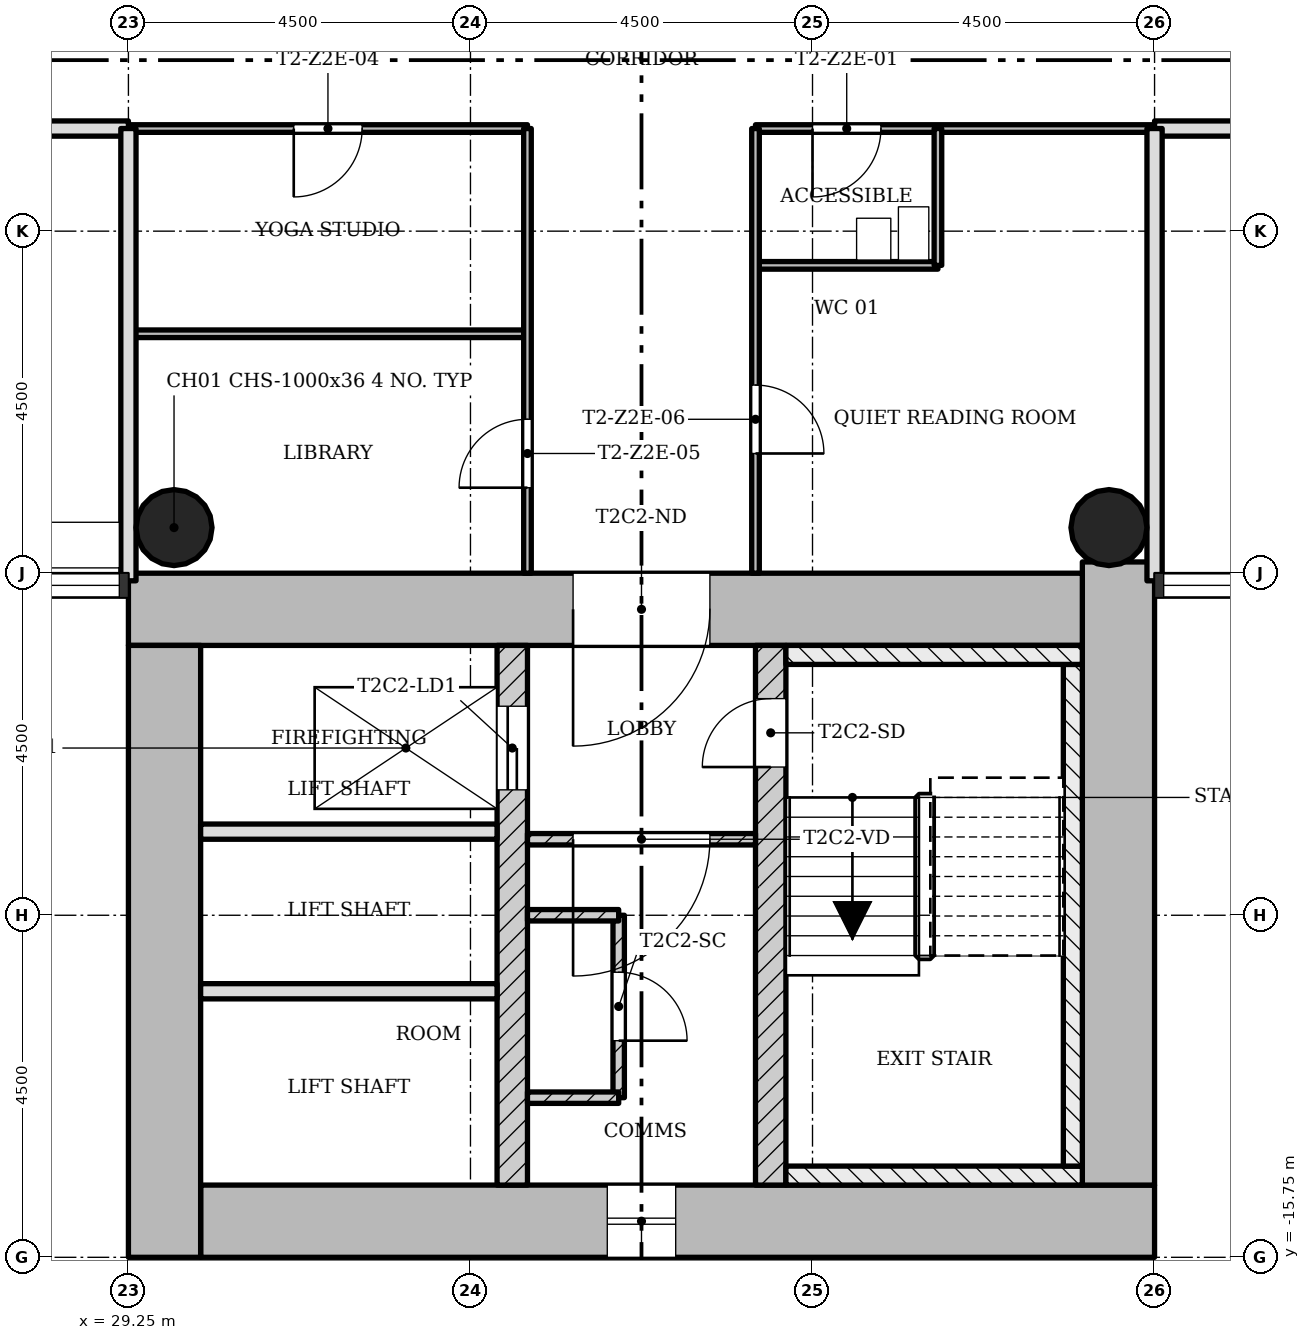
"""IFC4 building model, lengths in metres.
Left out: names, types, materials, properties, quantities, classifications, styles, units other than length and angle.
Written with IfcOpenShell. Run it as: python <this file> out.ifc"""

import sys

from ifc_helpers import new_model, si_unit, direction, frame, frame_2d, origin, origin_2d, place, context, subcontext, project, spatial, rectangle, hollow_circle, extrude, element, fill, save


model = new_model("IFC4")
c1 = context("Model", 3, precision=1e-05, world=origin(), true_north=direction((0.0, 1.0)))
c2 = subcontext(c1, "Body", "Model", "MODEL_VIEW")
j1 = project(units=[si_unit("LENGTHUNIT", "METRE"), si_unit("PLANEANGLEUNIT", "RADIAN")], contexts=[c1])
p1 = place(None, origin())
s1 = spatial("IfcSite", under=j1, at=p1, CompositionType="ELEMENT")
p2 = place(p1, origin())
s2 = spatial("IfcBuilding", under=s1, at=p2, CompositionType="ELEMENT")
p3 = place(p2, frame((0.0, 0.0, 103.8)))
s3 = spatial("IfcBuildingStorey", under=s2, at=p3, CompositionType="ELEMENT", Elevation=103.8)
p4 = place(p3, frame((30.2, -15.275, 0.0), z_axis=(0.0, 0.0, 1.0), x_axis=(1.0, 0.0, 0.0)))
e1 = element("IfcWall", 1, at=p4, inside=s3, PredefinedType="SHEAR", context=c2, shape_type="SweptSolid", body=[
    extrude(rectangle(XDim=12.55, YDim=0.95, at=frame_2d((6.275, 0.0))), origin(), (0.0, 0.0, 1.0), 3.4),
])
p5 = place(p4, frame((5.35, 0.0, 0.45)))
e2 = element("IfcOpeningElement", 2, at=p5, cuts=e1, PredefinedType="OPENING", context=c2, shape_type="SweptSolid", body=[
    extrude(rectangle(XDim=0.9, YDim=2.4, at=frame_2d((0.45, 1.2))), frame((0.0, 0.485, 0.0), z_axis=(0.0, -1.0, 0.0), x_axis=(1.0, 0.0, 0.0)), (0.0, 0.0, 1.0), 0.97),
])
p6 = place(p3, frame((42.275, -14.8, 0.0), z_axis=(0.0, 0.0, 1.0), x_axis=(0.0, 1.0, 0.0)))
e3 = element("IfcWall", 3, at=p6, inside=s3, PredefinedType="SHEAR", context=c2, shape_type="SweptSolid", body=[
    extrude(rectangle(XDim=8.198, YDim=0.95, at=frame_2d((4.099, 0.0))), origin(), (0.0, 0.0, 1.0), 3.4),
])
p7 = place(p3, frame((41.8, -7.225, 0.0), z_axis=(0.0, 0.0, 1.0), x_axis=(-1.0, 0.0, 0.0)))
e4 = element("IfcWall", 4, at=p7, inside=s3, PredefinedType="SHEAR", context=c2, shape_type="SweptSolid", body=[
    extrude(rectangle(XDim=12.55, YDim=0.95, at=frame_2d((6.275, 0.0))), origin(), (0.0, 0.0, 1.0), 3.4),
])
p8 = place(p7, frame((4.9, 0.0, 0.0)))
e5 = element("IfcOpeningElement", 5, at=p8, cuts=e4, PredefinedType="OPENING", context=c2, shape_type="SweptSolid", body=[
    extrude(rectangle(XDim=1.8, YDim=2.1, at=frame_2d((0.9, 1.05))), frame((0.0, 0.485, 0.0), z_axis=(0.0, -1.0, 0.0), x_axis=(1.0, 0.0, 0.0)), (0.0, 0.0, 1.0), 0.97),
])
p9 = place(p3, frame((29.725, -7.7, 0.0), z_axis=(0.0, 0.0, 1.0), x_axis=(0.0, -1.0, 0.0)))
e6 = element("IfcWall", 6, at=p9, inside=s3, PredefinedType="SHEAR", context=c2, shape_type="SweptSolid", body=[
    extrude(rectangle(XDim=8.05, YDim=0.95, at=frame_2d((4.025, 0.0))), origin(), (0.0, 0.0, 1.0), 3.4),
])
p10 = place(p3, frame((34.3, -14.8, 0.0), z_axis=(0.0, 0.0, 1.0), x_axis=(0.0, 1.0, 0.0)))
e7 = element("IfcWall", 7, at=p10, inside=s3, PredefinedType="SHEAR", context=c2, shape_type="SweptSolid", body=[
    extrude(rectangle(XDim=7.1, YDim=0.4, at=frame_2d((3.55, 0.0))), origin(), (0.0, 0.0, 1.0), 3.4),
])
p11 = place(p10, frame((5.2, 0.0, 0.0)))
e8 = element("IfcOpeningElement", 8, at=p11, cuts=e7, PredefinedType="OPENING", context=c2, shape_type="SweptSolid", body=[
    extrude(rectangle(XDim=1.1, YDim=2.1, at=frame_2d((0.55, 1.05))), frame((0.0, 0.21, 0.0), z_axis=(0.0, -1.0, 0.0), x_axis=(1.0, 0.0, 0.0)), (0.0, 0.0, 1.0), 0.42),
])
p12 = place(p3, frame((37.7, -14.8, 0.0), z_axis=(0.0, 0.0, 1.0), x_axis=(0.0, 1.0, 0.0)))
e9 = element("IfcWall", 9, at=p12, inside=s3, PredefinedType="SHEAR", context=c2, shape_type="SweptSolid", body=[
    extrude(rectangle(XDim=7.1, YDim=0.4, at=frame_2d((3.55, 0.0))), origin(), (0.0, 0.0, 1.0), 3.4),
])
p13 = place(p12, frame((5.5, 0.0, 0.0)))
e10 = element("IfcOpeningElement", 10, at=p13, cuts=e9, PredefinedType="OPENING", context=c2, shape_type="SweptSolid", body=[
    extrude(rectangle(XDim=0.9, YDim=2.1, at=frame_2d((0.45, 1.05))), frame((0.0, 0.21, 0.0), z_axis=(0.0, -1.0, 0.0), x_axis=(1.0, 0.0, 0.0)), (0.0, 0.0, 1.0), 0.42),
])
for number, where, z_axis, x_axis in (
    (11, (42.15, -6.15, 0.0), (0.0, 0.0, 1.0), (1.0, 0.0, 0.0)),
    (12, (29.85, -6.15, 0.0), (0.0, 0.0, 1.0), (1.0, 0.0, 0.0)),
):
    element("IfcColumn", number, at=place(p3, frame(where, z_axis=z_axis, x_axis=x_axis)), inside=s3, PredefinedType="COLUMN", context=c2, shape_type="SweptSolid", body=[
        extrude(hollow_circle(Radius=0.5, WallThickness=0.036, at=origin_2d()), origin(), (0.0, 0.0, 1.0), 3.4),
    ])
p14 = place(p3, frame((34.5, -10.25, 0.0), z_axis=(0.0, 0.0, 1.0), x_axis=(1.0, 0.0, 0.0)))
e13 = element("IfcWall", 13, at=p14, inside=s3, PredefinedType="PARTITIONING", context=c2, shape_type="SweptSolid", body=[
    extrude(rectangle(XDim=3.0, YDim=0.15, at=frame_2d((1.5, 0.0))), origin(), (0.0, 0.0, 1.0), 3.0),
])
p15 = place(p14, frame((0.6, 0.0, 0.0)))
e14 = element("IfcOpeningElement", 14, at=p15, cuts=e13, PredefinedType="OPENING", context=c2, shape_type="SweptSolid", body=[
    extrude(rectangle(XDim=1.8, YDim=2.1, at=frame_2d((0.9, 1.05))), frame((0.0, 0.085, 0.0), z_axis=(0.0, -1.0, 0.0), x_axis=(1.0, 0.0, 0.0)), (0.0, 0.0, 1.0), 0.17),
])
for number, where, z_axis, x_axis in (
    (15, (30.2, -10.15, 0.0), (0.0, 0.0, 1.0), (1.0, 0.0, 0.0)),
    (16, (30.2, -12.25, 0.0), (0.0, 0.0, 1.0), (1.0, 0.0, 0.0)),
):
    element("IfcWall", number, at=place(p3, frame(where, z_axis=z_axis, x_axis=x_axis)), inside=s3, PredefinedType="SOLIDWALL", context=c2, shape_type="SweptSolid", body=[
        extrude(rectangle(XDim=3.9, YDim=0.2, at=frame_2d((1.95, 0.0))), origin(), (0.0, 0.0, 1.0), 3.0),
    ])
p16 = place(p3, frame((35.7, -11.25, 0.0), z_axis=(0.0, 0.0, 1.0), x_axis=(0.0, -1.0, 0.0)))
e17 = element("IfcWall", 17, at=p16, inside=s3, PredefinedType="PARTITIONING", context=c2, shape_type="SweptSolid", body=[
    extrude(rectangle(XDim=2.4, YDim=0.15, at=frame_2d((1.2, 0.0))), origin(), (0.0, 0.0, 1.0), 3.0),
])
p17 = place(p16, frame((0.75, 0.0, 0.0)))
e18 = element("IfcOpeningElement", 18, at=p17, cuts=e17, PredefinedType="OPENING", context=c2, shape_type="SweptSolid", body=[
    extrude(rectangle(XDim=0.9, YDim=2.1, at=frame_2d((0.45, 1.05))), frame((0.0, 0.085, 0.0), z_axis=(0.0, -1.0, 0.0), x_axis=(1.0, 0.0, 0.0)), (0.0, 0.0, 1.0), 0.17),
])
for number, where, z_axis, x_axis in (
    (19, (35.7, -11.25, 0.0), (0.0, 0.0, 1.0), (-1.0, 0.0, 0.0)),
    (20, (35.7, -13.65, 0.0), (0.0, 0.0, 1.0), (-1.0, 0.0, 0.0)),
):
    element("IfcWall", number, at=place(p3, frame(where, z_axis=z_axis, x_axis=x_axis)), inside=s3, PredefinedType="PARTITIONING", context=c2, shape_type="SweptSolid", body=[
        extrude(rectangle(XDim=1.2, YDim=0.15, at=frame_2d((0.6, 0.0))), origin(), (0.0, 0.0, 1.0), 3.0),
    ])
p18 = place(p3, frame((34.5, -3.6, 0.0), z_axis=(0.0, 0.0, 1.0), x_axis=(-1.0, 0.0, 0.0)))
e21 = element("IfcWall", 21, at=p18, inside=s3, PredefinedType="PARTITIONING", context=c2, shape_type="SweptSolid", body=[
    extrude(rectangle(XDim=5.25, YDim=0.1, at=frame_2d((2.625, 0.0))), origin(), (0.0, 0.0, 1.0), 3.0),
])
p19 = place(p3, frame((39.9, -2.7, 0.0), z_axis=(0.0, 0.0, 1.0), x_axis=(-1.0, 0.0, 0.0)))
e22 = element("IfcWall", 22, at=p19, inside=s3, PredefinedType="PARTITIONING", context=c2, shape_type="SweptSolid", body=[
    extrude(rectangle(XDim=2.4, YDim=0.1, at=frame_2d((1.2, 0.0))), origin(), (0.0, 0.0, 1.0), 3.0),
])
p20 = place(p3, frame((42.75, -0.9, 0.0), z_axis=(0.0, 0.0, 1.0), x_axis=(-1.0, 0.0, 0.0)))
e23 = element("IfcWall", 23, at=p20, inside=s3, PredefinedType="PARTITIONING", context=c2, shape_type="SweptSolid", body=[
    extrude(rectangle(XDim=5.25, YDim=0.1, at=frame_2d((2.625, 0.0))), origin(), (0.0, 0.0, 1.0), 3.0),
])
p21 = place(p20, frame((3.6, 0.0, 0.0)))
e24 = element("IfcOpeningElement", 24, at=p21, cuts=e23, PredefinedType="OPENING", context=c2, shape_type="SweptSolid", body=[
    extrude(rectangle(XDim=0.9, YDim=2.1, at=frame_2d((0.45, 1.05))), frame((0.0, 0.06, 0.0), z_axis=(0.0, -1.0, 0.0), x_axis=(1.0, 0.0, 0.0)), (0.0, 0.0, 1.0), 0.12),
])
p22 = place(p3, frame((34.5, -0.9, 0.0), z_axis=(0.0, 0.0, 1.0), x_axis=(-1.0, 0.0, 0.0)))
e25 = element("IfcWall", 25, at=p22, inside=s3, PredefinedType="PARTITIONING", context=c2, shape_type="SweptSolid", body=[
    extrude(rectangle(XDim=5.25, YDim=0.1, at=frame_2d((2.625, 0.0))), origin(), (0.0, 0.0, 1.0), 3.0),
])
p23 = place(p22, frame((2.175, 0.0, 0.0)))
e26 = element("IfcOpeningElement", 26, at=p23, cuts=e25, PredefinedType="OPENING", context=c2, shape_type="SweptSolid", body=[
    extrude(rectangle(XDim=0.9, YDim=2.1, at=frame_2d((0.45, 1.05))), frame((0.0, 0.06, 0.0), z_axis=(0.0, -1.0, 0.0), x_axis=(1.0, 0.0, 0.0)), (0.0, 0.0, 1.0), 0.12),
])
for number, where, z_axis, x_axis in (
    (27, (44.55, -0.9, 0.0), (0.0, 0.0, 1.0), (-1.0, 0.0, 0.0)),
    (28, (29.25, -0.9, 0.0), (0.0, 0.0, 1.0), (-1.0, 0.0, 0.0)),
):
    element("IfcWall", number, at=place(p3, frame(where, z_axis=z_axis, x_axis=x_axis)), inside=s3, PredefinedType="SOLIDWALL", context=c2, shape_type="SweptSolid", body=[
        extrude(rectangle(XDim=1.8, YDim=0.2, at=frame_2d((0.9, 0.0))), origin(), (0.0, 0.0, 1.0), 3.0),
    ])
p24 = place(p3, frame((42.75, -6.85, 0.0), z_axis=(0.0, 0.0, 1.0), x_axis=(0.0, 1.0, 0.0)))
e29 = element("IfcWall", 29, at=p24, inside=s3, PredefinedType="SOLIDWALL", context=c2, shape_type="SweptSolid", body=[
    extrude(rectangle(XDim=5.95, YDim=0.2, at=frame_2d((2.975, 0.0))), origin(), (0.0, 0.0, 1.0), 3.0),
])
p25 = place(p3, frame((39.9, -2.7, 0.0), z_axis=(0.0, 0.0, 1.0), x_axis=(0.0, 1.0, 0.0)))
e30 = element("IfcWall", 30, at=p25, inside=s3, PredefinedType="PARTITIONING", context=c2, shape_type="SweptSolid", body=[
    extrude(rectangle(XDim=1.8, YDim=0.1, at=frame_2d((0.9, 0.0))), origin(), (0.0, 0.0, 1.0), 3.0),
])
p26 = place(p3, frame((37.5, -6.75, 0.0), z_axis=(0.0, 0.0, 1.0), x_axis=(0.0, 1.0, 0.0)))
e31 = element("IfcWall", 31, at=p26, inside=s3, PredefinedType="PARTITIONING", context=c2, shape_type="SweptSolid", body=[
    extrude(rectangle(XDim=5.85, YDim=0.1, at=frame_2d((2.925, 0.0))), origin(), (0.0, 0.0, 1.0), 3.0),
])
p27 = place(p26, frame((1.575, 0.0, 0.0)))
e32 = element("IfcOpeningElement", 32, at=p27, cuts=e31, PredefinedType="OPENING", context=c2, shape_type="SweptSolid", body=[
    extrude(rectangle(XDim=0.9, YDim=2.1, at=frame_2d((0.45, 1.05))), frame((0.0, 0.06, 0.0), z_axis=(0.0, -1.0, 0.0), x_axis=(1.0, 0.0, 0.0)), (0.0, 0.0, 1.0), 0.12),
])
p28 = place(p3, frame((34.5, -6.75, 0.0), z_axis=(0.0, 0.0, 1.0), x_axis=(0.0, 1.0, 0.0)))
e33 = element("IfcWall", 33, at=p28, inside=s3, PredefinedType="PARTITIONING", context=c2, shape_type="SweptSolid", body=[
    extrude(rectangle(XDim=5.85, YDim=0.1, at=frame_2d((2.925, 0.0))), origin(), (0.0, 0.0, 1.0), 3.0),
])
p29 = place(p28, frame((1.125, 0.0, 0.0)))
e34 = element("IfcOpeningElement", 34, at=p29, cuts=e33, PredefinedType="OPENING", context=c2, shape_type="SweptSolid", body=[
    extrude(rectangle(XDim=0.9, YDim=2.1, at=frame_2d((0.45, 1.05))), frame((0.0, 0.06, 0.0), z_axis=(0.0, -1.0, 0.0), x_axis=(1.0, 0.0, 0.0)), (0.0, 0.0, 1.0), 0.12),
])
p30 = place(p3, frame((29.25, -6.85, 0.0), z_axis=(0.0, 0.0, 1.0), x_axis=(0.0, 1.0, 0.0)))
e35 = element("IfcWall", 35, at=p30, inside=s3, PredefinedType="SOLIDWALL", context=c2, shape_type="SweptSolid", body=[
    extrude(rectangle(XDim=5.95, YDim=0.2, at=frame_2d((2.975, 0.0))), origin(), (0.0, 0.0, 1.0), 3.0),
])
p31 = place(p3, frame((37.9, -14.675, 0.0), z_axis=(0.0, 0.0, 1.0), x_axis=(1.0, 0.0, 0.0)))
e36 = element("IfcWall", 36, at=p31, inside=s3, PredefinedType="SHEAR", context=c2, shape_type="SweptSolid", body=[
    extrude(rectangle(XDim=3.9, YDim=0.25, at=frame_2d((1.95, 0.0))), origin(), (0.0, 0.0, 1.0), 3.4),
])
p32 = place(p3, frame((41.675, -7.95, 0.0), z_axis=(0.0, 0.0, 1.0), x_axis=(0.0, -1.0, 0.0)))
e37 = element("IfcWall", 37, at=p32, inside=s3, PredefinedType="SHEAR", context=c2, shape_type="SweptSolid", body=[
    extrude(rectangle(XDim=6.6, YDim=0.25, at=frame_2d((3.3, 0.0))), origin(), (0.0, 0.0, 1.0), 3.4),
])
p33 = place(p3, frame((37.9, -7.825, 0.0), z_axis=(0.0, 0.0, 1.0), x_axis=(1.0, 0.0, 0.0)))
e38 = element("IfcWall", 38, at=p33, inside=s3, PredefinedType="SHEAR", context=c2, shape_type="SweptSolid", body=[
    extrude(rectangle(XDim=3.9, YDim=0.25, at=frame_2d((1.95, 0.0))), origin(), (0.0, 0.0, 1.0), 3.4),
])
p34 = place(p5, origin())
e39 = element("IfcWindow", 39, at=p34, inside=s3, PartitioningType="SINGLE_PANEL", PredefinedType="WINDOW", context=c2, shape_type="SweptSolid", body=[
    extrude(rectangle(XDim=0.9, YDim=2.4, at=frame_2d((0.45, 1.2))), frame((0.0, 0.03, 0.0), z_axis=(0.0, -1.0, 0.0), x_axis=(1.0, 0.0, 0.0)), (0.0, 0.0, 1.0), 0.06),
])
fill(e2, e39)
p35 = place(p15, origin())
e40 = element("IfcDoor", 40, at=p35, inside=s3, OperationType="SINGLE_SWING_LEFT", PredefinedType="DOOR", context=c2, shape_type="SweptSolid", body=[
    extrude(rectangle(XDim=1.8, YDim=2.1, at=frame_2d((0.9, 1.05))), frame((0.0, 0.025, 0.0), z_axis=(0.0, -1.0, 0.0), x_axis=(1.0, 0.0, 0.0)), (0.0, 0.0, 1.0), 0.05),
])
fill(e14, e40)
p36 = place(p17, origin())
e41 = element("IfcDoor", 41, at=p36, inside=s3, OperationType="SINGLE_SWING_LEFT", PredefinedType="DOOR", context=c2, shape_type="SweptSolid", body=[
    extrude(rectangle(XDim=0.9, YDim=2.1, at=frame_2d((0.45, 1.05))), frame((0.0, 0.025, 0.0), z_axis=(0.0, -1.0, 0.0), x_axis=(1.0, 0.0, 0.0)), (0.0, 0.0, 1.0), 0.05),
])
fill(e18, e41)
p37 = place(p21, origin())
e42 = element("IfcDoor", 42, at=p37, inside=s3, OperationType="SINGLE_SWING_LEFT", PredefinedType="DOOR", context=c2, shape_type="SweptSolid", body=[
    extrude(rectangle(XDim=0.9, YDim=2.1, at=frame_2d((0.45, 1.05))), frame((0.0, 0.025, 0.0), z_axis=(0.0, -1.0, 0.0), x_axis=(1.0, 0.0, 0.0)), (0.0, 0.0, 1.0), 0.05),
])
fill(e24, e42)
p38 = place(p23, origin())
e43 = element("IfcDoor", 43, at=p38, inside=s3, OperationType="SINGLE_SWING_LEFT", PredefinedType="DOOR", context=c2, shape_type="SweptSolid", body=[
    extrude(rectangle(XDim=0.9, YDim=2.1, at=frame_2d((0.45, 1.05))), frame((0.0, 0.025, 0.0), z_axis=(0.0, -1.0, 0.0), x_axis=(1.0, 0.0, 0.0)), (0.0, 0.0, 1.0), 0.05),
])
fill(e26, e43)
p39 = place(p29, origin())
e44 = element("IfcDoor", 44, at=p39, inside=s3, OperationType="SINGLE_SWING_RIGHT", PredefinedType="DOOR", context=c2, shape_type="SweptSolid", body=[
    extrude(rectangle(XDim=0.9, YDim=2.1, at=frame_2d((0.45, 1.05))), frame((0.0, 0.025, 0.0), z_axis=(0.0, -1.0, 0.0), x_axis=(1.0, 0.0, 0.0)), (0.0, 0.0, 1.0), 0.05),
])
fill(e34, e44)
p40 = place(p27, origin())
e45 = element("IfcDoor", 45, at=p40, inside=s3, OperationType="SINGLE_SWING_LEFT", PredefinedType="DOOR", context=c2, shape_type="SweptSolid", body=[
    extrude(rectangle(XDim=0.9, YDim=2.1, at=frame_2d((0.45, 1.05))), frame((0.0, 0.025, 0.0), z_axis=(0.0, -1.0, 0.0), x_axis=(1.0, 0.0, 0.0)), (0.0, 0.0, 1.0), 0.05),
])
fill(e32, e45)
p41 = place(p13, origin())
e46 = element("IfcDoor", 46, at=p41, inside=s3, OperationType="SINGLE_SWING_RIGHT", PredefinedType="DOOR", context=c2, shape_type="SweptSolid", body=[
    extrude(rectangle(XDim=0.9, YDim=2.1, at=frame_2d((0.45, 1.05))), frame((0.0, 0.025, 0.0), z_axis=(0.0, -1.0, 0.0), x_axis=(1.0, 0.0, 0.0)), (0.0, 0.0, 1.0), 0.05),
])
fill(e10, e46)
p42 = place(p11, origin())
e47 = element("IfcDoor", 47, at=p42, inside=s3, OperationType="SLIDING_TO_LEFT", PredefinedType="DOOR", context=c2, shape_type="SweptSolid", body=[
    extrude(rectangle(XDim=1.1, YDim=2.1, at=frame_2d((0.55, 1.05))), frame((0.0, 0.025, 0.0), z_axis=(0.0, -1.0, 0.0), x_axis=(1.0, 0.0, 0.0)), (0.0, 0.0, 1.0), 0.05),
])
fill(e8, e47)
p43 = place(p8, origin())
e48 = element("IfcDoor", 48, at=p43, inside=s3, OperationType="SINGLE_SWING_LEFT", PredefinedType="DOOR", context=c2, shape_type="SweptSolid", body=[
    extrude(rectangle(XDim=1.8, YDim=2.1, at=frame_2d((0.9, 1.05))), frame((0.0, 0.025, 0.0), z_axis=(0.0, -1.0, 0.0), x_axis=(1.0, 0.0, 0.0)), (0.0, 0.0, 1.0), 0.05),
])
fill(e5, e48)
save(model, sys.argv[1])
